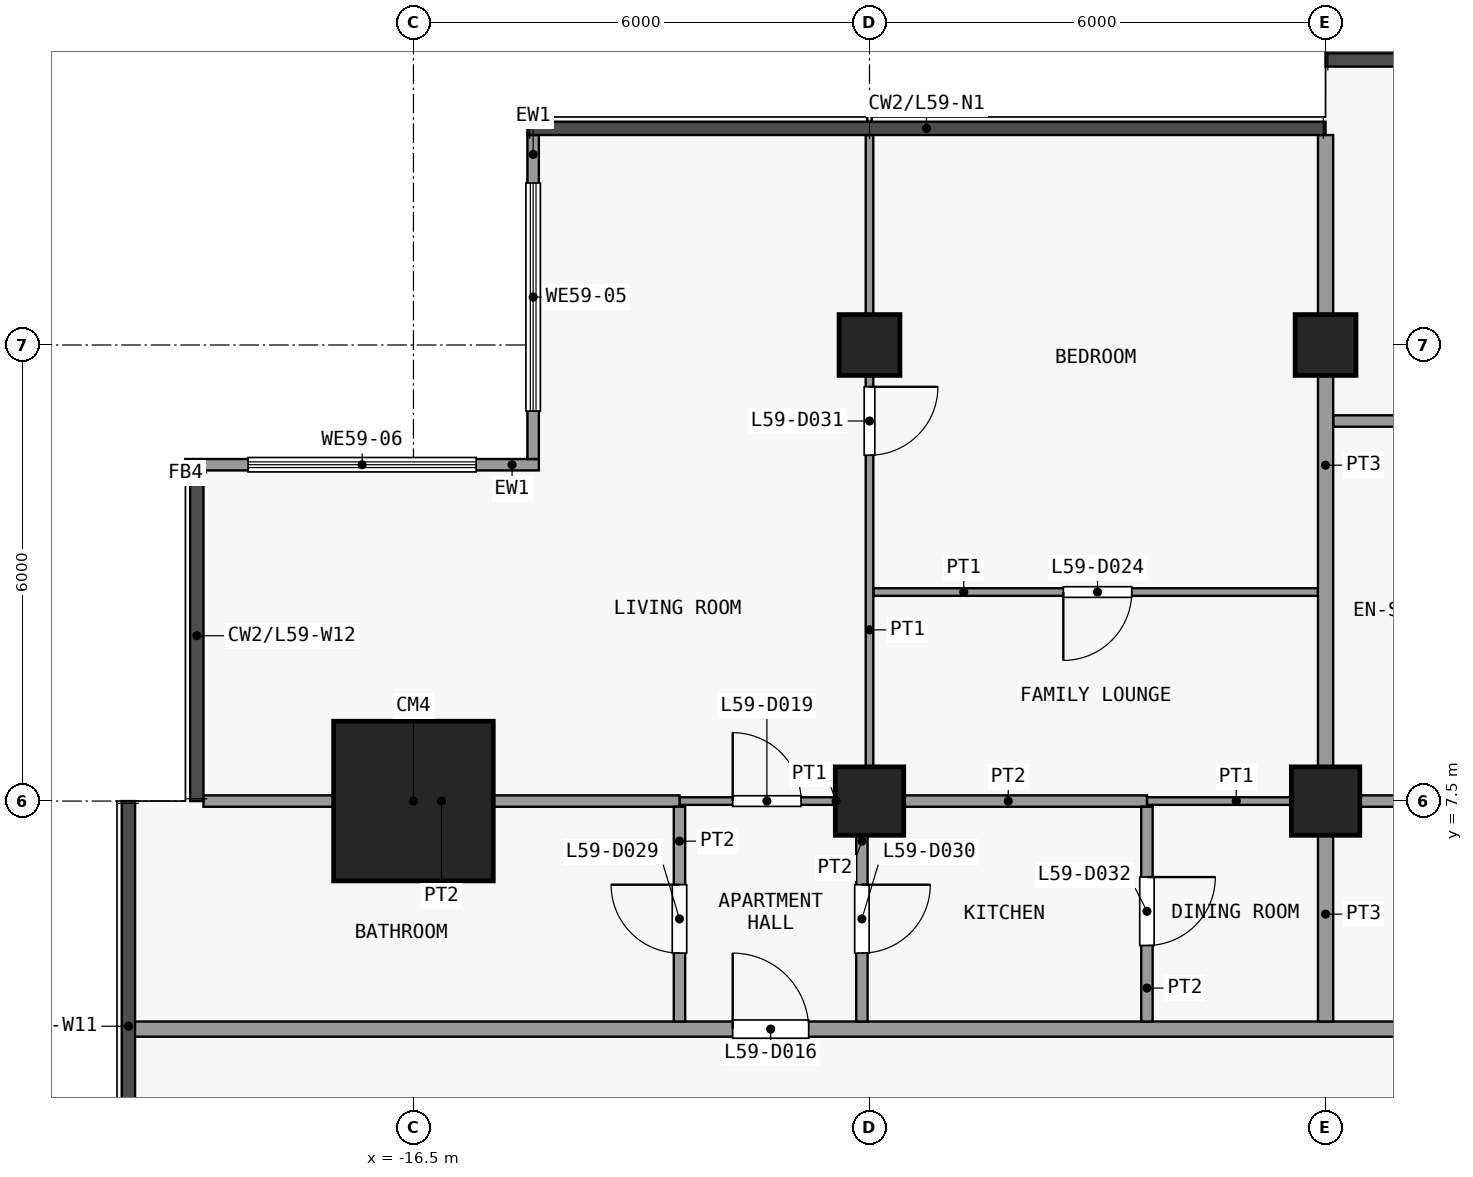
"""IFC4 building model, lengths in metres.
Left out: names, types, materials, properties, quantities, classifications, styles, units other than length and angle.
Written with IfcOpenShell. Run it as: python <this file> out.ifc"""

import sys

from ifc_helpers import new_model, si_unit, direction, frame, frame_2d, origin, origin_2d, place, context, subcontext, project, spatial, rectangle, extrude, element, fill, save


model = new_model("IFC4")
c1 = context("Model", 3, precision=1e-05, world=origin(), true_north=direction((0.0, 1.0)))
c2 = subcontext(c1, "Body", "Model", "MODEL_VIEW")
j1 = project(units=[si_unit("LENGTHUNIT", "METRE"), si_unit("PLANEANGLEUNIT", "RADIAN")], contexts=[c1])
p1 = place(None, origin())
s1 = spatial("IfcSite", under=j1, at=p1, CompositionType="ELEMENT")
p2 = place(p1, origin())
s2 = spatial("IfcBuilding", under=s1, at=p2, CompositionType="ELEMENT")
p3 = place(p2, frame((0.0, 0.0, 233.9)))
s3 = spatial("IfcBuildingStorey", under=s2, at=p3, CompositionType="ELEMENT", Elevation=233.9)
p4 = place(p3, frame((-16.5, 7.5, 0.0), z_axis=(0.0, 0.0, 1.0), x_axis=(1.0, 0.0, 0.0)))
e1 = element("IfcColumn", 1, at=p4, inside=s3, PredefinedType="COLUMN", context=c2, shape_type="SweptSolid", body=[
    extrude(rectangle(XDim=2.1, YDim=2.1, at=origin_2d()), origin(), (0.0, 0.0, 1.0), 3.6),
])
p5 = place(p3, frame((-10.5, 7.5, 0.0), z_axis=(0.0, 0.0, 1.0), x_axis=(1.0, 0.0, 0.0)))
e2 = element("IfcColumn", 2, at=p5, inside=s3, PredefinedType="COLUMN", context=c2, shape_type="SweptSolid", body=[
    extrude(rectangle(XDim=0.9, YDim=0.9, at=origin_2d()), origin(), (0.0, 0.0, 1.0), 3.6),
])
p6 = place(p3, frame((-10.5, 13.5, 0.0), z_axis=(0.0, 0.0, 1.0), x_axis=(1.0, 0.0, 0.0)))
e3 = element("IfcColumn", 3, at=p6, inside=s3, PredefinedType="COLUMN", context=c2, shape_type="SweptSolid", body=[
    extrude(rectangle(XDim=0.8, YDim=0.8, at=origin_2d()), origin(), (0.0, 0.0, 1.0), 3.6),
])
p7 = place(p3, frame((-4.5, 7.5, 0.0), z_axis=(0.0, 0.0, 1.0), x_axis=(1.0, 0.0, 0.0)))
e4 = element("IfcColumn", 4, at=p7, inside=s3, PredefinedType="COLUMN", context=c2, shape_type="SweptSolid", body=[
    extrude(rectangle(XDim=0.9, YDim=0.9, at=origin_2d()), origin(), (0.0, 0.0, 1.0), 3.6),
])
p8 = place(p3, frame((-4.5, 13.5, 0.0), z_axis=(0.0, 0.0, 1.0), x_axis=(1.0, 0.0, 0.0)))
e5 = element("IfcColumn", 5, at=p8, inside=s3, PredefinedType="COLUMN", context=c2, shape_type="SweptSolid", body=[
    extrude(rectangle(XDim=0.8, YDim=0.8, at=origin_2d()), origin(), (0.0, 0.0, 1.0), 3.6),
])
p9 = place(p3, frame((-14.925, 12.0, 0.0), z_axis=(0.0, 0.0, 1.0), x_axis=(0.0, 1.0, 0.0)))
e6 = element("IfcWall", 6, at=p9, inside=s3, PredefinedType="SOLIDWALL", context=c2, shape_type="SweptSolid", body=[
    extrude(rectangle(XDim=4.262, YDim=0.15, at=frame_2d((2.131, 0.0))), origin(), (0.0, 0.0, 1.0), 3.3),
])
p10 = place(p9, frame((0.631, 0.0, 0.9)))
e7 = element("IfcOpeningElement", 7, at=p10, cuts=e6, PredefinedType="OPENING", context=c2, shape_type="SweptSolid", body=[
    extrude(rectangle(XDim=3.0, YDim=2.4, at=frame_2d((1.5, 1.2))), frame((0.0, 0.085, 0.0), z_axis=(0.0, -1.0, 0.0), x_axis=(1.0, 0.0, 0.0)), (0.0, 0.0, 1.0), 0.17),
])
p11 = place(p3, frame((-19.5, 11.925, 0.0), z_axis=(0.0, 0.0, 1.0), x_axis=(1.0, 0.0, 0.0)))
e8 = element("IfcWall", 8, at=p11, inside=s3, PredefinedType="SOLIDWALL", context=c2, shape_type="SweptSolid", body=[
    extrude(rectangle(XDim=4.65, YDim=0.15, at=frame_2d((2.325, 0.0))), origin(), (0.0, 0.0, 1.0), 3.3),
])
p12 = place(p11, frame((0.825, 0.0, 0.9)))
e9 = element("IfcOpeningElement", 9, at=p12, cuts=e8, PredefinedType="OPENING", context=c2, shape_type="SweptSolid", body=[
    extrude(rectangle(XDim=3.0, YDim=2.4, at=frame_2d((1.5, 1.2))), frame((0.0, 0.085, 0.0), z_axis=(0.0, -1.0, 0.0), x_axis=(1.0, 0.0, 0.0)), (0.0, 0.0, 1.0), 0.17),
])
p13 = place(p3, frame((-20.25, 4.5, 0.0), z_axis=(0.0, 0.0, 1.0), x_axis=(1.0, 0.0, 0.0)))
e10 = element("IfcWall", 10, at=p13, inside=s3, PredefinedType="PARTITIONING", context=c2, shape_type="SweptSolid", body=[
    extrude(rectangle(XDim=39.6, YDim=0.2, at=frame_2d((19.8, 0.0))), origin(), (0.0, 0.0, 1.0), 3.3),
])
p14 = place(p13, frame((7.95, 0.0, 0.0)))
e11 = element("IfcOpeningElement", 11, at=p14, cuts=e10, PredefinedType="OPENING", context=c2, shape_type="SweptSolid", body=[
    extrude(rectangle(XDim=1.0, YDim=2.1, at=frame_2d((0.5, 1.05))), frame((0.0, 0.11, 0.0), z_axis=(0.0, -1.0, 0.0), x_axis=(1.0, 0.0, 0.0)), (0.0, 0.0, 1.0), 0.22),
])
p15 = place(p13, frame((25.45, 0.0, 0.0)))
e12 = element("IfcOpeningElement", 12, at=p15, cuts=e10, PredefinedType="OPENING", context=c2, shape_type="SweptSolid", body=[
    extrude(rectangle(XDim=1.0, YDim=2.1, at=frame_2d((0.5, 1.05))), frame((0.0, 0.11, 0.0), z_axis=(0.0, -1.0, 0.0), x_axis=(1.0, 0.0, 0.0)), (0.0, 0.0, 1.0), 0.22),
])
p16 = place(p13, frame((33.95, 0.0, 0.0)))
e13 = element("IfcOpeningElement", 13, at=p16, cuts=e10, PredefinedType="OPENING", context=c2, shape_type="SweptSolid", body=[
    extrude(rectangle(XDim=1.0, YDim=2.1, at=frame_2d((0.5, 1.05))), frame((0.0, 0.11, 0.0), z_axis=(0.0, -1.0, 0.0), x_axis=(1.0, 0.0, 0.0)), (0.0, 0.0, 1.0), 0.22),
])
p17 = place(p3, frame((-13.0, 7.5, 0.0), z_axis=(0.0, 0.0, 1.0), x_axis=(1.0, 0.0, 0.0)))
e14 = element("IfcWall", 14, at=p17, inside=s3, PredefinedType="PARTITIONING", context=c2, shape_type="SweptSolid", body=[
    extrude(rectangle(XDim=2.4, YDim=0.1, at=frame_2d((1.2, 0.0))), origin(), (0.0, 0.0, 1.0), 3.3),
])
p18 = place(p17, frame((0.7, 0.0, 0.0)))
e15 = element("IfcOpeningElement", 15, at=p18, cuts=e14, PredefinedType="OPENING", context=c2, shape_type="SweptSolid", body=[
    extrude(rectangle(XDim=0.9, YDim=2.1, at=frame_2d((0.45, 1.05))), frame((0.0, 0.06, 0.0), z_axis=(0.0, -1.0, 0.0), x_axis=(1.0, 0.0, 0.0)), (0.0, 0.0, 1.0), 0.12),
])
p19 = place(p3, frame((-6.85, 7.5, 0.0), z_axis=(0.0, 0.0, 1.0), x_axis=(1.0, 0.0, 0.0)))
e16 = element("IfcWall", 16, at=p19, inside=s3, PredefinedType="PARTITIONING", context=c2, shape_type="SweptSolid", body=[
    extrude(rectangle(XDim=2.35, YDim=0.1, at=frame_2d((1.175, 0.0))), origin(), (0.0, 0.0, 1.0), 3.3),
])
p20 = place(p3, frame((-19.262, 7.5, 0.0), z_axis=(0.0, 0.0, 1.0), x_axis=(1.0, 0.0, 0.0)))
e17 = element("IfcWall", 17, at=p20, inside=s3, PredefinedType="PARTITIONING", context=c2, shape_type="SweptSolid", body=[
    extrude(rectangle(XDim=6.262, YDim=0.15, at=frame_2d((3.131, 0.0))), origin(), (0.0, 0.0, 1.0), 3.3),
])
p21 = place(p3, frame((-10.5, 7.5, 0.0), z_axis=(0.0, 0.0, 1.0), x_axis=(1.0, 0.0, 0.0)))
e18 = element("IfcWall", 18, at=p21, inside=s3, PredefinedType="PARTITIONING", context=c2, shape_type="SweptSolid", body=[
    extrude(rectangle(XDim=3.65, YDim=0.15, at=frame_2d((1.825, 0.0))), origin(), (0.0, 0.0, 1.0), 3.3),
])
p22 = place(p3, frame((-4.5, 7.5, 0.0), z_axis=(0.0, 0.0, 1.0), x_axis=(1.0, 0.0, 0.0)))
e19 = element("IfcWall", 19, at=p22, inside=s3, PredefinedType="PARTITIONING", context=c2, shape_type="SweptSolid", body=[
    extrude(rectangle(XDim=9.0, YDim=0.15, at=frame_2d((4.5, 0.0))), origin(), (0.0, 0.0, 1.0), 3.3),
])
p23 = place(p22, frame((5.7, 0.0, 0.0)))
e20 = element("IfcOpeningElement", 20, at=p23, cuts=e19, PredefinedType="OPENING", context=c2, shape_type="SweptSolid", body=[
    extrude(rectangle(XDim=0.9, YDim=2.1, at=frame_2d((0.45, 1.05))), frame((0.0, 0.085, 0.0), z_axis=(0.0, -1.0, 0.0), x_axis=(1.0, 0.0, 0.0)), (0.0, 0.0, 1.0), 0.17),
])
p24 = place(p3, frame((-10.45, 10.25, 0.0), z_axis=(0.0, 0.0, 1.0), x_axis=(1.0, 0.0, 0.0)))
e21 = element("IfcWall", 21, at=p24, inside=s3, PredefinedType="PARTITIONING", context=c2, shape_type="SweptSolid", body=[
    extrude(rectangle(XDim=5.85, YDim=0.1, at=frame_2d((2.925, 0.0))), origin(), (0.0, 0.0, 1.0), 3.3),
])
p25 = place(p24, frame((2.5, 0.0, 0.0)))
e22 = element("IfcOpeningElement", 22, at=p25, cuts=e21, PredefinedType="OPENING", context=c2, shape_type="SweptSolid", body=[
    extrude(rectangle(XDim=0.9, YDim=2.1, at=frame_2d((0.45, 1.05))), frame((0.0, 0.06, 0.0), z_axis=(0.0, -1.0, 0.0), x_axis=(1.0, 0.0, 0.0)), (0.0, 0.0, 1.0), 0.12),
])
p26 = place(p3, frame((-4.4, 12.5, 0.0), z_axis=(0.0, 0.0, 1.0), x_axis=(1.0, 0.0, 0.0)))
e23 = element("IfcWall", 23, at=p26, inside=s3, PredefinedType="PARTITIONING", context=c2, shape_type="SweptSolid", body=[
    extrude(rectangle(XDim=3.2, YDim=0.15, at=frame_2d((1.6, 0.0))), origin(), (0.0, 0.0, 1.0), 3.3),
])
p27 = place(p26, frame((1.1, 0.0, 0.0)))
e24 = element("IfcOpeningElement", 24, at=p27, cuts=e23, PredefinedType="OPENING", context=c2, shape_type="SweptSolid", body=[
    extrude(rectangle(XDim=0.9, YDim=2.1, at=frame_2d((0.45, 1.05))), frame((0.0, 0.085, 0.0), z_axis=(0.0, -1.0, 0.0), x_axis=(1.0, 0.0, 0.0)), (0.0, 0.0, 1.0), 0.17),
])
p28 = place(p3, frame((-13.0, 4.6, 0.0), z_axis=(0.0, 0.0, 1.0), x_axis=(0.0, 1.0, 0.0)))
e25 = element("IfcWall", 25, at=p28, inside=s3, PredefinedType="PARTITIONING", context=c2, shape_type="SweptSolid", body=[
    extrude(rectangle(XDim=2.825, YDim=0.15, at=frame_2d((1.413, 0.0))), origin(), (0.0, 0.0, 1.0), 3.3),
])
p29 = place(p28, frame((0.9, 0.0, 0.0)))
e26 = element("IfcOpeningElement", 26, at=p29, cuts=e25, PredefinedType="OPENING", context=c2, shape_type="SweptSolid", body=[
    extrude(rectangle(XDim=0.9, YDim=2.1, at=frame_2d((0.45, 1.05))), frame((0.0, 0.085, 0.0), z_axis=(0.0, -1.0, 0.0), x_axis=(1.0, 0.0, 0.0)), (0.0, 0.0, 1.0), 0.17),
])
p30 = place(p3, frame((-10.6, 4.6, 0.0), z_axis=(0.0, 0.0, 1.0), x_axis=(0.0, 1.0, 0.0)))
e27 = element("IfcWall", 27, at=p30, inside=s3, PredefinedType="PARTITIONING", context=c2, shape_type="SweptSolid", body=[
    extrude(rectangle(XDim=2.825, YDim=0.15, at=frame_2d((1.413, 0.0))), origin(), (0.0, 0.0, 1.0), 3.3),
])
p31 = place(p30, frame((0.9, 0.0, 0.0)))
e28 = element("IfcOpeningElement", 28, at=p31, cuts=e27, PredefinedType="OPENING", context=c2, shape_type="SweptSolid", body=[
    extrude(rectangle(XDim=0.9, YDim=2.1, at=frame_2d((0.45, 1.05))), frame((0.0, 0.085, 0.0), z_axis=(0.0, -1.0, 0.0), x_axis=(1.0, 0.0, 0.0)), (0.0, 0.0, 1.0), 0.17),
])
p32 = place(p3, frame((-10.5, 7.575, 0.0), z_axis=(0.0, 0.0, 1.0), x_axis=(0.0, 1.0, 0.0)))
e29 = element("IfcWall", 29, at=p32, inside=s3, PredefinedType="PARTITIONING", context=c2, shape_type="SweptSolid", body=[
    extrude(rectangle(XDim=8.688, YDim=0.1, at=frame_2d((4.344, 0.0))), origin(), (0.0, 0.0, 1.0), 3.3),
])
p33 = place(p32, frame((4.475, 0.0, 0.0)))
e30 = element("IfcOpeningElement", 30, at=p33, cuts=e29, PredefinedType="OPENING", context=c2, shape_type="SweptSolid", body=[
    extrude(rectangle(XDim=0.9, YDim=2.1, at=frame_2d((0.45, 1.05))), frame((0.0, 0.06, 0.0), z_axis=(0.0, -1.0, 0.0), x_axis=(1.0, 0.0, 0.0)), (0.0, 0.0, 1.0), 0.12),
])
p34 = place(p3, frame((-6.85, 4.6, 0.0), z_axis=(0.0, 0.0, 1.0), x_axis=(0.0, 1.0, 0.0)))
e31 = element("IfcWall", 31, at=p34, inside=s3, PredefinedType="PARTITIONING", context=c2, shape_type="SweptSolid", body=[
    extrude(rectangle(XDim=2.825, YDim=0.15, at=frame_2d((1.413, 0.0))), origin(), (0.0, 0.0, 1.0), 3.3),
])
p35 = place(p34, frame((1.0, 0.0, 0.0)))
e32 = element("IfcOpeningElement", 32, at=p35, cuts=e31, PredefinedType="OPENING", context=c2, shape_type="SweptSolid", body=[
    extrude(rectangle(XDim=0.9, YDim=2.1, at=frame_2d((0.45, 1.05))), frame((0.0, 0.085, 0.0), z_axis=(0.0, -1.0, 0.0), x_axis=(1.0, 0.0, 0.0)), (0.0, 0.0, 1.0), 0.17),
])
p36 = place(p3, frame((-4.5, 4.6, 0.0), z_axis=(0.0, 0.0, 1.0), x_axis=(0.0, 1.0, 0.0)))
e33 = element("IfcWall", 33, at=p36, inside=s3, PredefinedType="PARTITIONING", context=c2, shape_type="SweptSolid", body=[
    extrude(rectangle(XDim=2.825, YDim=0.2, at=frame_2d((1.413, 0.0))), origin(), (0.0, 0.0, 1.0), 3.3),
])
p37 = place(p3, frame((-4.5, 7.575, 0.0), z_axis=(0.0, 0.0, 1.0), x_axis=(0.0, 1.0, 0.0)))
e34 = element("IfcWall", 34, at=p37, inside=s3, PredefinedType="PARTITIONING", context=c2, shape_type="SweptSolid", body=[
    extrude(rectangle(XDim=8.688, YDim=0.2, at=frame_2d((4.344, 0.0))), origin(), (0.0, 0.0, 1.0), 3.3),
])
p38 = place(p10, origin())
e35 = element("IfcWindow", 35, at=p38, inside=s3, PartitioningType="SINGLE_PANEL", PredefinedType="WINDOW", context=c2, shape_type="SweptSolid", body=[
    extrude(rectangle(XDim=3.0, YDim=2.4, at=frame_2d((1.5, 1.2))), frame((0.0, 0.03, 0.0), z_axis=(0.0, -1.0, 0.0), x_axis=(1.0, 0.0, 0.0)), (0.0, 0.0, 1.0), 0.06),
])
fill(e7, e35)
p39 = place(p12, origin())
e36 = element("IfcWindow", 36, at=p39, inside=s3, PartitioningType="SINGLE_PANEL", PredefinedType="WINDOW", context=c2, shape_type="SweptSolid", body=[
    extrude(rectangle(XDim=3.0, YDim=2.4, at=frame_2d((1.5, 1.2))), frame((0.0, 0.03, 0.0), z_axis=(0.0, -1.0, 0.0), x_axis=(1.0, 0.0, 0.0)), (0.0, 0.0, 1.0), 0.06),
])
fill(e9, e36)
p40 = place(p14, origin())
e37 = element("IfcDoor", 37, at=p40, inside=s3, OperationType="SINGLE_SWING_RIGHT", PredefinedType="DOOR", context=c2, shape_type="SweptSolid", body=[
    extrude(rectangle(XDim=1.0, YDim=2.1, at=frame_2d((0.5, 1.05))), frame((0.0, 0.025, 0.0), z_axis=(0.0, -1.0, 0.0), x_axis=(1.0, 0.0, 0.0)), (0.0, 0.0, 1.0), 0.05),
])
fill(e11, e37)
p41 = place(p18, origin())
e38 = element("IfcDoor", 38, at=p41, inside=s3, OperationType="SINGLE_SWING_RIGHT", PredefinedType="DOOR", context=c2, shape_type="SweptSolid", body=[
    extrude(rectangle(XDim=0.9, YDim=2.1, at=frame_2d((0.45, 1.05))), frame((0.0, 0.025, 0.0), z_axis=(0.0, -1.0, 0.0), x_axis=(1.0, 0.0, 0.0)), (0.0, 0.0, 1.0), 0.05),
])
fill(e15, e38)
p42 = place(p25, origin())
e39 = element("IfcDoor", 39, at=p42, inside=s3, OperationType="SINGLE_SWING_LEFT", PredefinedType="DOOR", context=c2, shape_type="SweptSolid", body=[
    extrude(rectangle(XDim=0.9, YDim=2.1, at=frame_2d((0.45, 1.05))), frame((0.0, 0.025, 0.0), z_axis=(0.0, -1.0, 0.0), x_axis=(1.0, 0.0, 0.0)), (0.0, 0.0, 1.0), 0.05),
])
fill(e22, e39)
p43 = place(p29, origin())
e40 = element("IfcDoor", 40, at=p43, inside=s3, OperationType="SINGLE_SWING_LEFT", PredefinedType="DOOR", context=c2, shape_type="SweptSolid", body=[
    extrude(rectangle(XDim=0.9, YDim=2.1, at=frame_2d((0.45, 1.05))), frame((0.0, 0.025, 0.0), z_axis=(0.0, -1.0, 0.0), x_axis=(1.0, 0.0, 0.0)), (0.0, 0.0, 1.0), 0.05),
])
fill(e26, e40)
p44 = place(p31, origin())
e41 = element("IfcDoor", 41, at=p44, inside=s3, OperationType="SINGLE_SWING_RIGHT", PredefinedType="DOOR", context=c2, shape_type="SweptSolid", body=[
    extrude(rectangle(XDim=0.9, YDim=2.1, at=frame_2d((0.45, 1.05))), frame((0.0, 0.025, 0.0), z_axis=(0.0, -1.0, 0.0), x_axis=(1.0, 0.0, 0.0)), (0.0, 0.0, 1.0), 0.05),
])
fill(e28, e41)
p45 = place(p33, origin())
e42 = element("IfcDoor", 42, at=p45, inside=s3, OperationType="SINGLE_SWING_RIGHT", PredefinedType="DOOR", context=c2, shape_type="SweptSolid", body=[
    extrude(rectangle(XDim=0.9, YDim=2.1, at=frame_2d((0.45, 1.05))), frame((0.0, 0.025, 0.0), z_axis=(0.0, -1.0, 0.0), x_axis=(1.0, 0.0, 0.0)), (0.0, 0.0, 1.0), 0.05),
])
fill(e30, e42)
p46 = place(p35, origin())
e43 = element("IfcDoor", 43, at=p46, inside=s3, OperationType="SINGLE_SWING_RIGHT", PredefinedType="DOOR", context=c2, shape_type="SweptSolid", body=[
    extrude(rectangle(XDim=0.9, YDim=2.1, at=frame_2d((0.45, 1.05))), frame((0.0, 0.025, 0.0), z_axis=(0.0, -1.0, 0.0), x_axis=(1.0, 0.0, 0.0)), (0.0, 0.0, 1.0), 0.05),
])
fill(e32, e43)
save(model, sys.argv[1])
